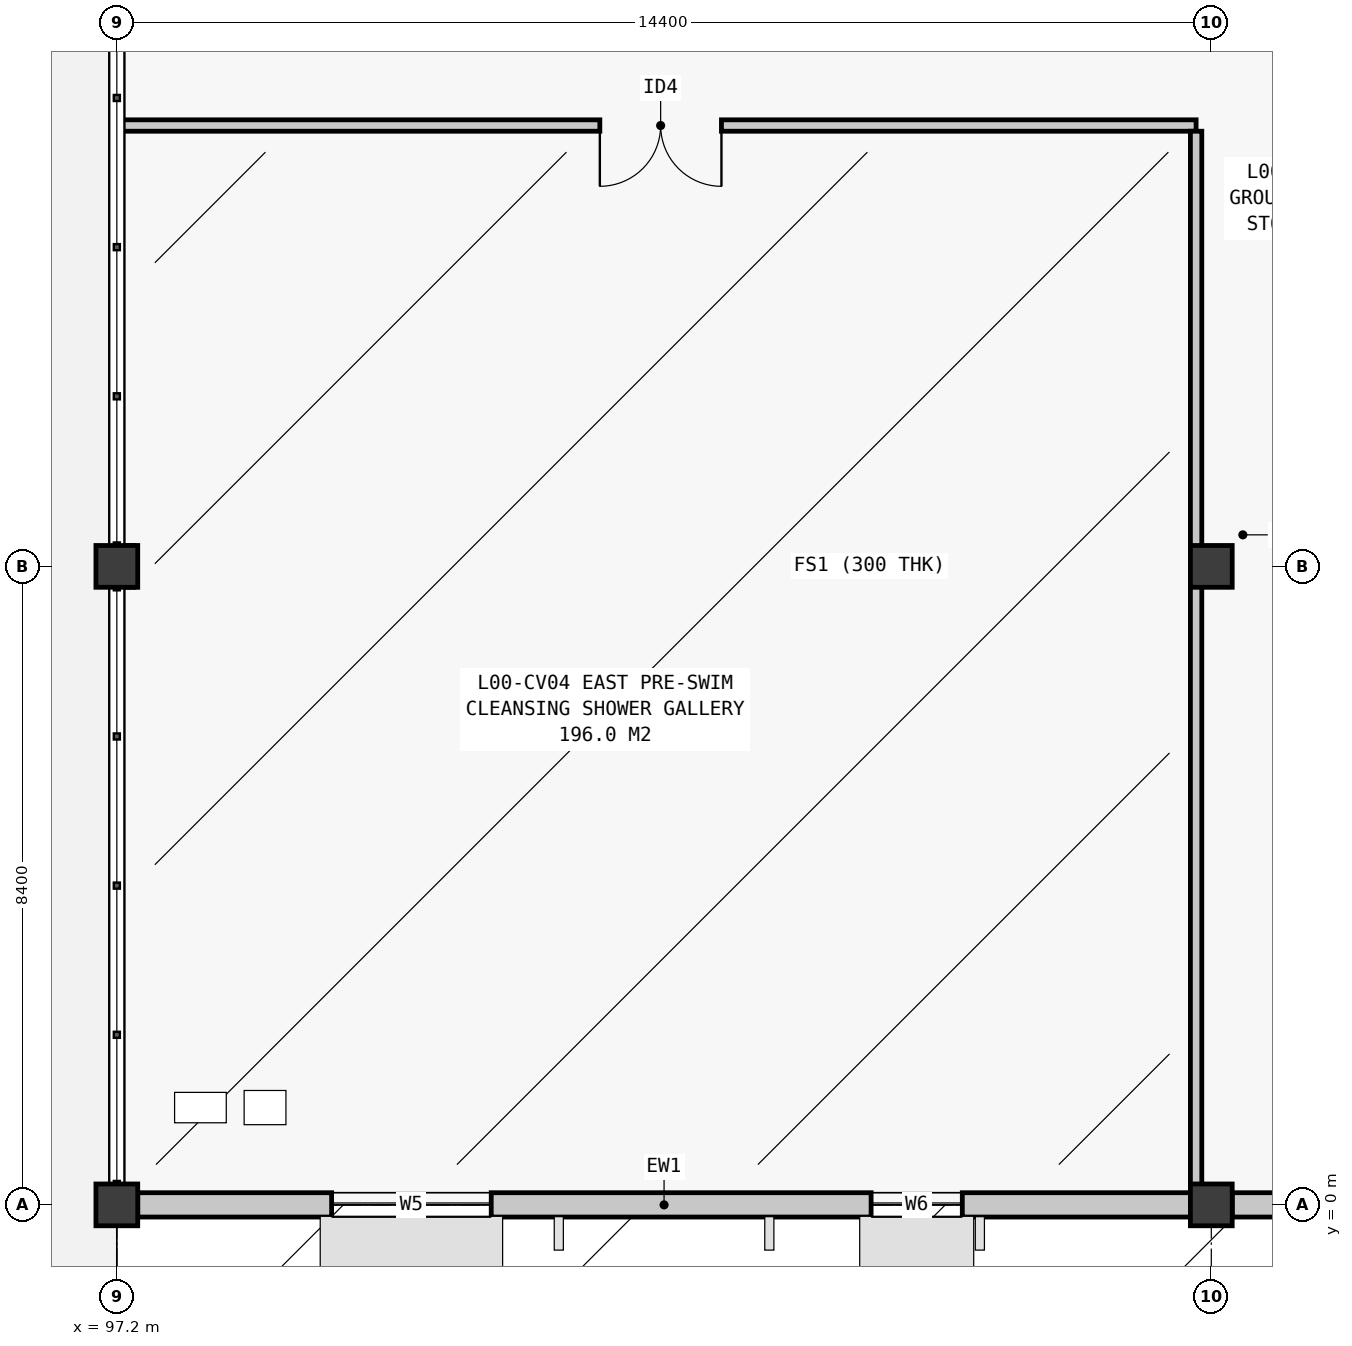
"""IFC4 building model, lengths in metres.
Left out: names, types, materials, properties, quantities, classifications, styles, units other than length and angle.
Written with IfcOpenShell. Run it as: python <this file> out.ifc"""

import sys

from ifc_helpers import new_model, si_unit, direction, frame, frame_2d, origin, origin_2d, place, context, subcontext, project, spatial, rectangle, extrude, element, fill, save


model = new_model("IFC4")
c1 = context("Model", 3, precision=1e-05, world=origin(), true_north=direction((0.0, 1.0)))
c2 = subcontext(c1, "Body", "Model", "MODEL_VIEW")
j1 = project(units=[si_unit("LENGTHUNIT", "METRE"), si_unit("PLANEANGLEUNIT", "RADIAN")], contexts=[c1])
p1 = place(None, origin())
s1 = spatial("IfcSite", under=j1, at=p1, CompositionType="ELEMENT")
p2 = place(p1, origin())
s2 = spatial("IfcBuilding", under=s1, at=p2, CompositionType="ELEMENT")
p3 = place(p2, origin())
s3 = spatial("IfcBuildingStorey", under=s2, at=p3, CompositionType="ELEMENT", Elevation=0.0)
for number, where, z_axis, x_axis in (
    (1, (97.2, 0.0, 0.0), (0.0, 0.0, 1.0), (1.0, 0.0, 0.0)),
    (2, (97.2, 8.4, 0.0), (0.0, 0.0, 1.0), (1.0, 0.0, 0.0)),
    (3, (111.6, 0.0, 0.0), (0.0, 0.0, 1.0), (1.0, 0.0, 0.0)),
    (4, (111.6, 8.4, 0.0), (0.0, 0.0, 1.0), (1.0, 0.0, 0.0)),
):
    element("IfcColumn", number, at=place(p3, frame(where, z_axis=z_axis, x_axis=x_axis)), inside=s3, PredefinedType="COLUMN", context=c2, shape_type="SweptSolid", body=[
        extrude(rectangle(XDim=0.55, YDim=0.55, at=origin_2d()), origin(), (0.0, 0.0, 1.0), 4.8),
    ])
p4 = place(p3, frame((97.475, 0.0, 0.0), z_axis=(0.0, 0.0, 1.0), x_axis=(1.0, 0.0, 0.0)))
e5 = element("IfcWall", 5, at=p4, inside=s3, PredefinedType="STANDARD", context=c2, shape_type="SweptSolid", body=[
    extrude(rectangle(XDim=13.85, YDim=0.32, at=frame_2d((6.925, 0.0))), origin(), (0.0, 0.0, 1.0), 3.833),
])
p5 = place(p4, frame((2.551, 0.0, 1.0)))
e6 = element("IfcOpeningElement", 6, at=p5, cuts=e5, PredefinedType="OPENING", context=c2, shape_type="SweptSolid", body=[
    extrude(rectangle(XDim=2.1, YDim=1.6, at=frame_2d((1.05, 0.8))), frame((0.0, 0.175, 0.0), z_axis=(0.0, -1.0, 0.0), x_axis=(1.0, 0.0, 0.0)), (0.0, 0.0, 1.0), 0.35),
])
p6 = place(p4, frame((9.649, 0.0, 1.1)))
e7 = element("IfcOpeningElement", 7, at=p6, cuts=e5, PredefinedType="OPENING", context=c2, shape_type="SweptSolid", body=[
    extrude(rectangle(XDim=1.2, YDim=1.5, at=frame_2d((0.6, 0.75))), frame((0.0, 0.175, 0.0), z_axis=(0.0, -1.0, 0.0), x_axis=(1.0, 0.0, 0.0)), (0.0, 0.0, 1.0), 0.35),
])
p7 = place(p3, frame((111.875, 0.0, 0.0), z_axis=(0.0, 0.0, 1.0), x_axis=(1.0, 0.0, 0.0)))
e8 = element("IfcWall", 8, at=p7, inside=s3, PredefinedType="STANDARD", context=c2, shape_type="SweptSolid", body=[
    extrude(rectangle(XDim=13.85, YDim=0.32, at=frame_2d((6.925, 0.0))), origin(), (0.0, 0.0, 1.0), 3.833),
])
p8 = place(p7, frame((5.825, 0.0, 0.0)))
e9 = element("IfcOpeningElement", 9, at=p8, cuts=e8, PredefinedType="OPENING", context=c2, shape_type="SweptSolid", body=[
    extrude(rectangle(XDim=2.2, YDim=2.4, at=frame_2d((1.1, 1.2))), frame((0.0, 0.175, 0.0), z_axis=(0.0, -1.0, 0.0), x_axis=(1.0, 0.0, 0.0)), (0.0, 0.0, 1.0), 0.35),
])
p9 = place(p7, frame((2.251, 0.0, 1.05)))
e10 = element("IfcOpeningElement", 10, at=p9, cuts=e8, PredefinedType="OPENING", context=c2, shape_type="SweptSolid", body=[
    extrude(rectangle(XDim=2.7, YDim=1.5, at=frame_2d((1.35, 0.75))), frame((0.0, 0.175, 0.0), z_axis=(0.0, -1.0, 0.0), x_axis=(1.0, 0.0, 0.0)), (0.0, 0.0, 1.0), 0.35),
])
p10 = place(p7, frame((9.349, 0.0, 1.35)))
e11 = element("IfcOpeningElement", 11, at=p10, cuts=e8, PredefinedType="OPENING", context=c2, shape_type="SweptSolid", body=[
    extrude(rectangle(XDim=1.8, YDim=1.2, at=frame_2d((0.9, 0.6))), frame((0.0, 0.175, 0.0), z_axis=(0.0, -1.0, 0.0), x_axis=(1.0, 0.0, 0.0)), (0.0, 0.0, 1.0), 0.35),
])
p11 = place(p3, frame((97.22, 14.2, 0.0), z_axis=(0.0, 0.0, 1.0), x_axis=(1.0, 0.0, 0.0)))
e12 = element("IfcWall", 12, at=p11, inside=s3, PredefinedType="PLUMBINGWALL", context=c2, shape_type="SweptSolid", body=[
    extrude(rectangle(XDim=14.18, YDim=0.15, at=frame_2d((7.09, 0.0))), origin(), (0.0, 0.0, 1.0), 4.52),
])
p12 = place(p11, frame((6.335, 0.0, 0.0)))
e13 = element("IfcOpeningElement", 13, at=p12, cuts=e12, PredefinedType="OPENING", context=c2, shape_type="SweptSolid", body=[
    extrude(rectangle(XDim=1.6, YDim=2.2, at=frame_2d((0.8, 1.1))), frame((0.0, 0.09, 0.0), z_axis=(0.0, -1.0, 0.0), x_axis=(1.0, 0.0, 0.0)), (0.0, 0.0, 1.0), 0.18),
])
p13 = place(p3, frame((111.4, 0.16, 0.0), z_axis=(0.0, 0.0, 1.0), x_axis=(0.0, 1.0, 0.0)))
e14 = element("IfcWall", 14, at=p13, inside=s3, PredefinedType="PLUMBINGWALL", context=c2, shape_type="SweptSolid", body=[
    extrude(rectangle(XDim=13.965, YDim=0.15, at=frame_2d((6.982, 0.0))), origin(), (0.0, 0.0, 1.0), 4.52),
])
p14 = place(p3, frame((97.35, 8.125, 0.0), z_axis=(0.0, 0.0, 1.0), x_axis=(0.0, 1.0, 0.0)))
e15 = element("IfcWall", 15, at=p14, inside=s3, PredefinedType="PLUMBINGWALL", context=c2, shape_type="SweptSolid", body=[
    extrude(rectangle(XDim=0.55, YDim=0.15, at=frame_2d((0.275, 0.0))), origin(), (0.0, 0.0, 1.0), 4.52),
])
p15 = place(p5, origin())
e16 = element("IfcWindow", 16, at=p15, inside=s3, PartitioningType="SINGLE_PANEL", PredefinedType="WINDOW", context=c2, shape_type="SweptSolid", body=[
    extrude(rectangle(XDim=2.1, YDim=1.6, at=frame_2d((1.05, 0.8))), frame((0.0, 0.03, 0.0), z_axis=(0.0, -1.0, 0.0), x_axis=(1.0, 0.0, 0.0)), (0.0, 0.0, 1.0), 0.06),
])
fill(e6, e16)
p16 = place(p6, origin())
e17 = element("IfcWindow", 17, at=p16, inside=s3, PartitioningType="SINGLE_PANEL", PredefinedType="WINDOW", context=c2, shape_type="SweptSolid", body=[
    extrude(rectangle(XDim=1.2, YDim=1.5, at=frame_2d((0.6, 0.75))), frame((0.0, 0.03, 0.0), z_axis=(0.0, -1.0, 0.0), x_axis=(1.0, 0.0, 0.0)), (0.0, 0.0, 1.0), 0.06),
])
fill(e7, e17)
p17 = place(p12, frame((1.6, 0.0, 0.0), z_axis=(0.0, 0.0, 1.0), x_axis=(-1.0, 0.0, 0.0)))
e18 = element("IfcDoor", 18, at=p17, inside=s3, OperationType="DOUBLE_DOOR_SINGLE_SWING", PredefinedType="DOOR", context=c2, shape_type="SweptSolid", body=[
    extrude(rectangle(XDim=1.6, YDim=2.2, at=frame_2d((0.8, 1.1))), frame((0.0, 0.025, 0.0), z_axis=(0.0, -1.0, 0.0), x_axis=(1.0, 0.0, 0.0)), (0.0, 0.0, 1.0), 0.05),
])
fill(e13, e18)
save(model, sys.argv[1])
